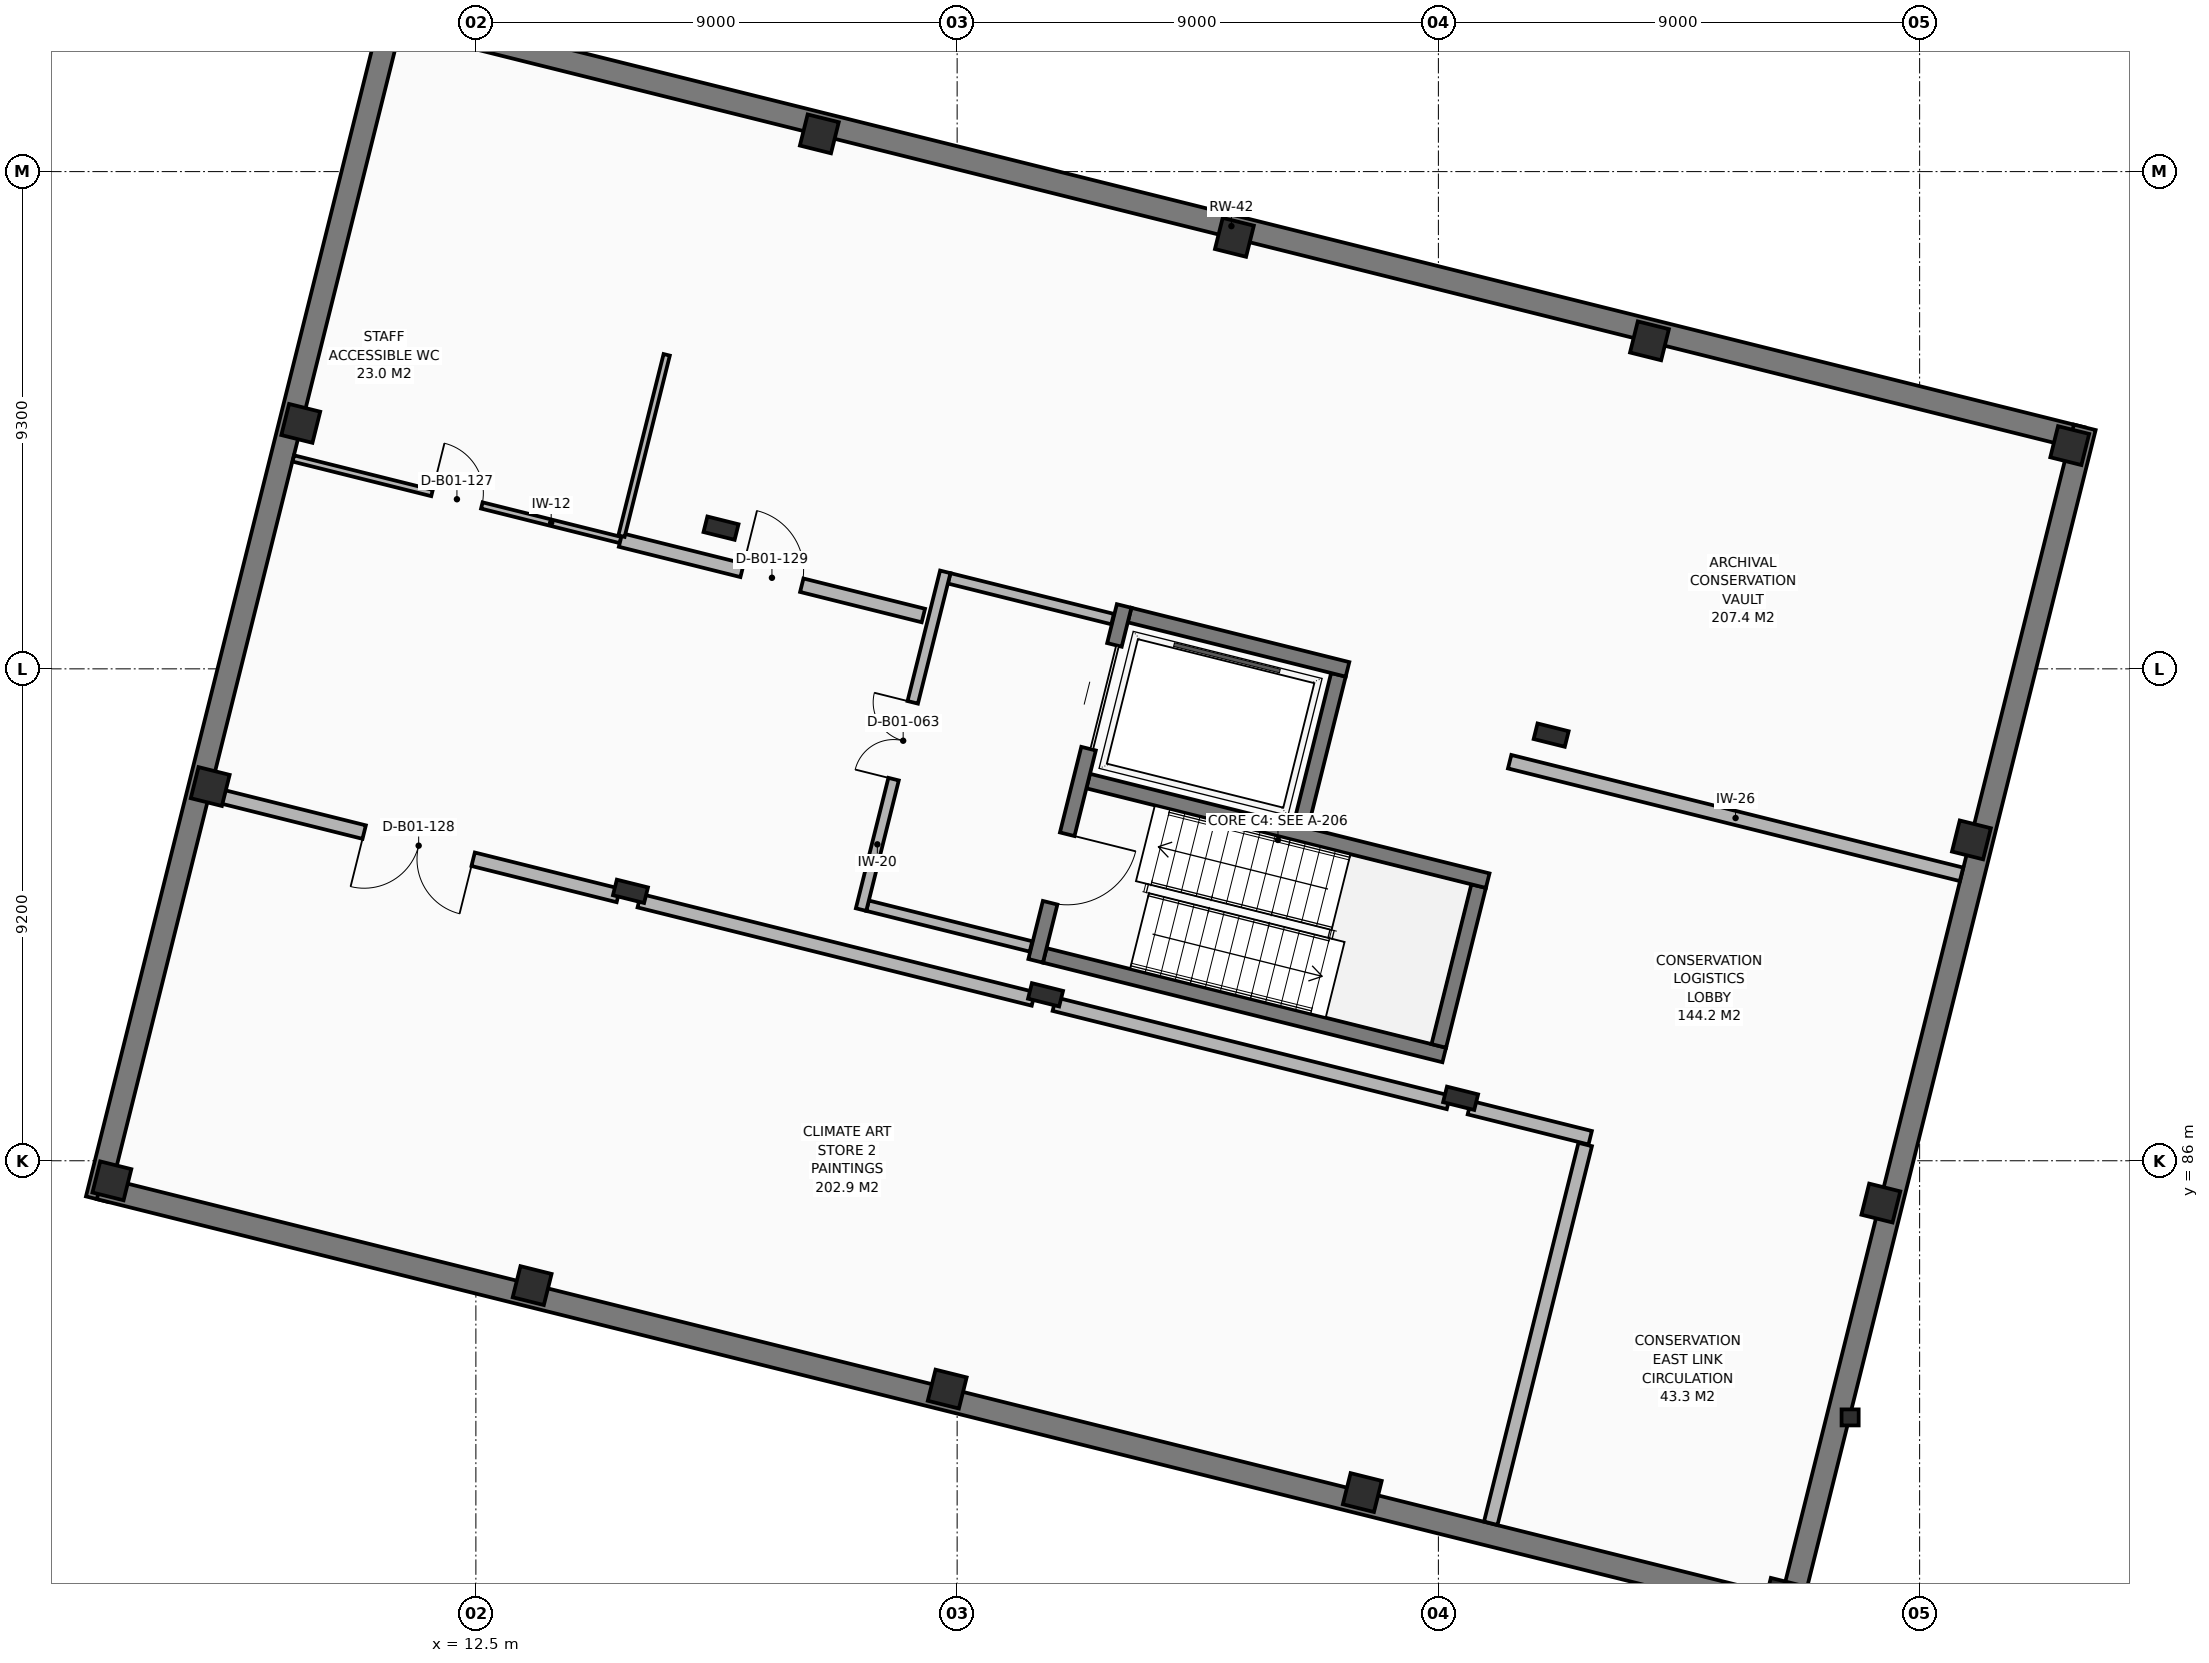
"""IFC4 building model, lengths in metres.
Left out: names, types, materials, properties, quantities, classifications, styles, units other than length and angle.
Written with IfcOpenShell. Run it as: python <this file> out.ifc"""

import sys

from ifc_helpers import new_model, si_unit, direction, frame, frame_2d, origin, origin_2d, place, context, subcontext, project, spatial, rectangle, i_section, extrude, element, fill, save


model = new_model("IFC4")
c1 = context("Model", 3, precision=1e-05, world=origin(), true_north=direction((0.0, 1.0)))
c2 = subcontext(c1, "Body", "Model", "MODEL_VIEW")
j1 = project(units=[si_unit("LENGTHUNIT", "METRE"), si_unit("PLANEANGLEUNIT", "RADIAN")], contexts=[c1])
p1 = place(None, origin())
s1 = spatial("IfcSite", under=j1, at=p1, CompositionType="ELEMENT")
p2 = place(p1, origin())
s2 = spatial("IfcBuilding", under=s1, at=p2, CompositionType="ELEMENT")
p3 = place(p2, frame((0.0, 0.0, -4.8)))
s3 = spatial("IfcBuildingStorey", under=s2, at=p3, CompositionType="ELEMENT", Elevation=-4.8)
for number, where, z_axis, x_axis in (
    (1, (5.693, 85.625, 0.0), (0.0, 0.0, 1.0), (0.97, -0.242, 0.0)),
    (2, (7.531, 92.999, 0.0), (0.0, 0.0, 1.0), (0.97, -0.242, 0.0)),
    (3, (9.225, 99.791, 0.0), (0.0, 0.0, 1.0), (0.97, -0.242, 0.0)),
    (4, (13.552, 83.665, 0.0), (0.0, 0.0, 1.0), (0.97, -0.242, 0.0)),
):
    element("IfcColumn", number, at=place(p3, frame(where, z_axis=z_axis, x_axis=x_axis)), inside=s3, PredefinedType="COLUMN", context=c2, shape_type="SweptSolid", body=[
        extrude(rectangle(XDim=0.6, YDim=0.6, at=origin_2d()), origin(), (0.0, 0.0, 1.0), 4.8),
    ])
for number, where, z_axis, x_axis in (
    (5, (15.391, 91.039, 0.0), (0.0, 0.0, 1.0), (0.97, -0.242, 0.0)),
    (6, (17.084, 97.831, 0.0), (0.0, 0.0, 1.0), (0.97, -0.242, 0.0)),
):
    element("IfcColumn", number, at=place(p3, frame(where, z_axis=z_axis, x_axis=x_axis)), inside=s3, PredefinedType="COLUMN", context=c2, shape_type="SweptSolid", body=[
        extrude(i_section(OverallWidth=0.3, OverallDepth=0.6, WebThickness=0.015, FlangeThickness=0.03, FilletRadius=0.027, at=origin_2d()), origin(), (0.0, 0.0, 1.0), 4.8),
    ])
for number, where, z_axis, x_axis in (
    (7, (18.923, 105.206, 0.0), (0.0, 0.0, 1.0), (0.97, -0.242, 0.0)),
    (8, (21.315, 81.73, 0.0), (0.0, 0.0, 1.0), (0.97, -0.242, 0.0)),
):
    element("IfcColumn", number, at=place(p3, frame(where, z_axis=z_axis, x_axis=x_axis)), inside=s3, PredefinedType="COLUMN", context=c2, shape_type="SweptSolid", body=[
        extrude(rectangle(XDim=0.6, YDim=0.6, at=origin_2d()), origin(), (0.0, 0.0, 1.0), 4.8),
    ])
p4 = place(p3, frame((23.153, 89.104, 0.0), z_axis=(0.0, 0.0, 1.0), x_axis=(0.970295726276, -0.2419218956, 0.0)))
e9 = element("IfcColumn", 9, at=p4, inside=s3, PredefinedType="COLUMN", context=c2, shape_type="SweptSolid", body=[
    extrude(i_section(OverallWidth=0.3, OverallDepth=0.6, WebThickness=0.015, FlangeThickness=0.03, FilletRadius=0.027, at=origin_2d()), origin(), (0.0, 0.0, 1.0), 4.8),
])
for number, where, z_axis, x_axis in (
    (10, (26.685, 103.27, 0.0), (0.0, 0.0, 1.0), (0.97, -0.242, 0.0)),
    (11, (29.077, 79.794, 0.0), (0.0, 0.0, 1.0), (0.97, -0.242, 0.0)),
):
    element("IfcColumn", number, at=place(p3, frame(where, z_axis=z_axis, x_axis=x_axis)), inside=s3, PredefinedType="COLUMN", context=c2, shape_type="SweptSolid", body=[
        extrude(rectangle(XDim=0.6, YDim=0.6, at=origin_2d()), origin(), (0.0, 0.0, 1.0), 4.8),
    ])
for number, where, z_axis, x_axis in (
    (12, (30.916, 87.169, 0.0), (0.0, 0.0, 1.0), (0.97, -0.242, 0.0)),
    (13, (32.609, 93.961, 0.0), (0.0, 0.0, 1.0), (0.97, -0.242, 0.0)),
):
    element("IfcColumn", number, at=place(p3, frame(where, z_axis=z_axis, x_axis=x_axis)), inside=s3, PredefinedType="COLUMN", context=c2, shape_type="SweptSolid", body=[
        extrude(i_section(OverallWidth=0.3, OverallDepth=0.6, WebThickness=0.015, FlangeThickness=0.03, FilletRadius=0.027, at=origin_2d()), origin(), (0.0, 0.0, 1.0), 4.8),
    ])
for number, where, z_axis, x_axis in (
    (14, (34.448, 101.335, 0.0), (0.0, 0.0, 1.0), (0.97, -0.242, 0.0)),
    (15, (36.936, 77.835, 0.0), (0.0, 0.0, 1.0), (0.97, -0.242, 0.0)),
    (16, (38.775, 85.209, 0.0), (0.0, 0.0, 1.0), (0.97, -0.242, 0.0)),
    (17, (40.469, 92.001, 0.0), (0.0, 0.0, 1.0), (0.97, -0.242, 0.0)),
    (18, (42.307, 99.375, 0.0), (0.0, 0.0, 1.0), (0.97, -0.242, 0.0)),
):
    element("IfcColumn", number, at=place(p3, frame(where, z_axis=z_axis, x_axis=x_axis)), inside=s3, PredefinedType="COLUMN", context=c2, shape_type="SweptSolid", body=[
        extrude(rectangle(XDim=0.6, YDim=0.6, at=origin_2d()), origin(), (0.0, 0.0, 1.0), 4.8),
    ])
p5 = place(p3, frame((38.2, 81.2, 0.0), z_axis=(0.0, 0.0, 1.0), x_axis=(1.0, 0.0, 0.0)))
e19 = element("IfcColumn", 19, at=p5, inside=s3, PredefinedType="COLUMN", context=c2, shape_type="SweptSolid", body=[
    extrude(i_section(OverallWidth=0.3, OverallDepth=0.32, WebThickness=0.011, FlangeThickness=0.021, FilletRadius=0.027, at=origin_2d()), origin(), (0.0, 0.0, 1.0), 4.8),
])
p6 = place(p3, frame((5.412, 85.282, 0.0), z_axis=(0.0, 0.0, 1.0), x_axis=(0.241923066972, 0.970295434219, 0.0)))
e20 = element("IfcWall", 20, at=p6, inside=s3, PredefinedType="USERDEFINED", context=c2, shape_type="SweptSolid", body=[
    extrude(rectangle(XDim=22.79, YDim=0.42, at=frame_2d((11.395, 0.0))), origin(), (0.0, 0.0, 1.0), 4.55),
])
p7 = place(p3, frame((10.721, 107.446, 0.0), z_axis=(0.0, 0.0, 1.0), x_axis=(0.970295598121, -0.241922409599, 0.0)))
e21 = element("IfcWall", 21, at=p7, inside=s3, PredefinedType="USERDEFINED", context=c2, shape_type="SweptSolid", body=[
    extrude(rectangle(XDim=32.79, YDim=0.42, at=frame_2d((16.395, 0.0))), origin(), (0.0, 0.0, 1.0), 4.55),
])
p8 = place(p3, frame((42.588, 99.718, 0.0), z_axis=(0.0, 0.0, 1.0), x_axis=(-0.241923066972, -0.970295434219, 0.0)))
e22 = element("IfcWall", 22, at=p8, inside=s3, PredefinedType="USERDEFINED", context=c2, shape_type="SweptSolid", body=[
    extrude(rectangle(XDim=22.79, YDim=0.42, at=frame_2d((11.395, 0.0))), origin(), (0.0, 0.0, 1.0), 4.55),
])
p9 = place(p3, frame((37.279, 77.554, 0.0), z_axis=(0.0, 0.0, 1.0), x_axis=(-0.970295598121, 0.241922409599, 0.0)))
e23 = element("IfcWall", 23, at=p9, inside=s3, PredefinedType="USERDEFINED", context=c2, shape_type="SweptSolid", body=[
    extrude(rectangle(XDim=32.79, YDim=0.42, at=frame_2d((16.395, 0.0))), origin(), (0.0, 0.0, 1.0), 4.55),
])
p10 = place(p3, frame((23.138, 89.841, 0.0), z_axis=(0.0, 0.0, 1.0), x_axis=(0.970295246537, -0.24192381972, 0.0)))
e24 = element("IfcWall", 24, at=p10, inside=s3, PredefinedType="SHEAR", context=c2, shape_type="SweptSolid", body=[
    extrude(rectangle(XDim=7.7, YDim=0.28, at=frame_2d((3.85, 0.0))), origin(), (0.0, 0.0, 1.0), 4.55),
])
p11 = place(p3, frame((30.508, 88.148, 0.0), z_axis=(0.0, 0.0, 1.0), x_axis=(0.241920098373, 0.970296174373, 0.0)))
e25 = element("IfcWall", 25, at=p11, inside=s3, PredefinedType="SHEAR", context=c2, shape_type="SweptSolid", body=[
    extrude(rectangle(XDim=3.08, YDim=0.28, at=frame_2d((1.54, 0.0))), origin(), (0.0, 0.0, 1.0), 4.55),
])
p12 = place(p3, frame((31.422, 91.239, 0.0), z_axis=(0.0, 0.0, 1.0), x_axis=(-0.970297102167, 0.241916377137, 0.0)))
e26 = element("IfcWall", 26, at=p12, inside=s3, PredefinedType="SHEAR", context=c2, shape_type="SweptSolid", body=[
    extrude(rectangle(XDim=7.7, YDim=0.28, at=frame_2d((3.85, 0.0))), origin(), (0.0, 0.0, 1.0), 4.55),
])
p13 = place(p3, frame((27.924, 92.255, 0.0), z_axis=(0.0, 0.0, 1.0), x_axis=(0.241886356621, 0.970304586447, 0.0)))
e27 = element("IfcWall", 27, at=p13, inside=s3, PredefinedType="SHEAR", context=c2, shape_type="SweptSolid", body=[
    extrude(rectangle(XDim=2.92, YDim=0.28, at=frame_2d((1.46, 0.0))), origin(), (0.0, 0.0, 1.0), 4.55),
])
p14 = place(p3, frame((28.8, 95.19, 0.0), z_axis=(0.0, 0.0, 1.0), x_axis=(-0.970292765557, 0.241933770084, 0.0)))
e28 = element("IfcWall", 28, at=p14, inside=s3, PredefinedType="SHEAR", context=c2, shape_type="SweptSolid", body=[
    extrude(rectangle(XDim=4.2, YDim=0.28, at=frame_2d((2.1, 0.0))), origin(), (0.0, 0.0, 1.0), 4.55),
])
p15 = place(p3, frame((24.623, 96.376, 0.0), z_axis=(0.0, 0.0, 1.0), x_axis=(-0.241922508616, -0.970295573434, 0.0)))
e29 = element("IfcWall", 29, at=p15, inside=s3, PredefinedType="SHEAR", context=c2, shape_type="SweptSolid", body=[
    extrude(rectangle(XDim=6.84, YDim=0.28, at=frame_2d((3.42, 0.0))), origin(), (0.0, 0.0, 1.0), 4.55),
])
p16 = place(p15, frame((0.75, 0.0, 0.0)))
e30 = element("IfcOpeningElement", 30, at=p16, cuts=e29, PredefinedType="OPENING", context=c2, shape_type="SweptSolid", body=[
    extrude(rectangle(XDim=2.0, YDim=2.3, at=frame_2d((1.0, 1.15))), frame((0.0, 0.15, 0.0), z_axis=(0.0, -1.0, 0.0), x_axis=(1.0, 0.0, 0.0)), (0.0, 0.0, 1.0), 0.3),
])
p17 = place(p15, frame((4.4, 0.0, 0.0)))
e31 = element("IfcOpeningElement", 31, at=p17, cuts=e29, PredefinedType="OPENING", context=c2, shape_type="SweptSolid", body=[
    extrude(rectangle(XDim=1.32, YDim=2.12, at=frame_2d((0.66, 1.06))), frame((0.0, 0.15, 0.0), z_axis=(0.0, -1.0, 0.0), x_axis=(1.0, 0.0, 0.0)), (0.0, 0.0, 1.0), 0.3),
])
p18 = place(p3, frame((19.824, 90.77, 0.0), z_axis=(0.0, 0.0, 1.0), x_axis=(0.970306396763, -0.241879094592, 0.0)))
e32 = element("IfcWall", 32, at=p18, inside=s3, PredefinedType="PARTITIONING", context=c2, shape_type="SweptSolid", body=[
    extrude(rectangle(XDim=3.15, YDim=0.2, at=frame_2d((1.575, 0.0))), origin(), (0.0, 0.0, 1.0), 4.55),
])
p19 = place(p3, frame((24.407, 96.131, 0.0), z_axis=(0.0, 0.0, 1.0), x_axis=(-0.970301862046, 0.241897285042, 0.0)))
e33 = element("IfcWall", 33, at=p19, inside=s3, PredefinedType="PARTITIONING", context=c2, shape_type="SweptSolid", body=[
    extrude(rectangle(XDim=3.15, YDim=0.2, at=frame_2d((1.575, 0.0))), origin(), (0.0, 0.0, 1.0), 4.04),
])
p20 = place(p3, frame((19.703, 90.698, 0.0), z_axis=(0.0, 0.0, 1.0), x_axis=(0.24192671796, 0.970294523914, 0.0)))
e34 = element("IfcWall", 34, at=p20, inside=s3, PredefinedType="PARTITIONING", context=c2, shape_type="SweptSolid", body=[
    extrude(rectangle(XDim=6.51, YDim=0.2, at=frame_2d((3.255, 0.0))), origin(), (0.0, 0.0, 1.0), 4.04),
])
p21 = place(p20, frame((2.515, 0.0, 0.0)))
e35 = element("IfcOpeningElement", 35, at=p21, cuts=e34, PredefinedType="OPENING", context=c2, shape_type="SweptSolid", body=[
    extrude(rectangle(XDim=1.48, YDim=2.15, at=frame_2d((0.74, 1.075))), frame((0.0, 0.11, 0.0), z_axis=(0.0, -1.0, 0.0), x_axis=(1.0, 0.0, 0.0)), (0.0, 0.0, 1.0), 0.22),
])
p22 = place(p3, frame((9.086, 99.135, 0.0), z_axis=(0.0, 0.0, 1.0), x_axis=(0.970301709613, -0.241897896483, 0.0)))
e36 = element("IfcWall", 36, at=p22, inside=s3, PredefinedType="PARTITIONING", context=c2, shape_type="SweptSolid", body=[
    extrude(rectangle(XDim=6.306, YDim=0.12, at=frame_2d((3.153, 0.0))), origin(), (0.0, 0.0, 1.0), 4.09),
])
p23 = place(p22, frame((2.673, 0.0, 0.0)))
e37 = element("IfcOpeningElement", 37, at=p23, cuts=e36, PredefinedType="OPENING", context=c2, shape_type="SweptSolid", body=[
    extrude(rectangle(XDim=0.96, YDim=2.1, at=frame_2d((0.48, 1.05))), frame((0.0, 0.07, 0.0), z_axis=(0.0, -1.0, 0.0), x_axis=(1.0, 0.0, 0.0)), (0.0, 0.0, 1.0), 0.14),
])
p24 = place(p3, frame((15.164, 90.962, 0.0), z_axis=(0.0, 0.0, 1.0), x_axis=(-0.970289717068, 0.24194599594, 0.0)))
e38 = element("IfcWall", 38, at=p24, inside=s3, PredefinedType="PARTITIONING", context=c2, shape_type="SweptSolid", body=[
    extrude(rectangle(XDim=7.697, YDim=0.26, at=frame_2d((3.849, 0.0))), origin(), (0.0, 0.0, 1.0), 4.04),
])
p25 = place(p24, frame((2.799, 0.0, 0.0)))
e39 = element("IfcOpeningElement", 39, at=p25, cuts=e38, PredefinedType="OPENING", context=c2, shape_type="SweptSolid", body=[
    extrude(rectangle(XDim=2.1, YDim=2.25, at=frame_2d((1.05, 1.125))), frame((0.0, 0.14, 0.0), z_axis=(0.0, -1.0, 0.0), x_axis=(1.0, 0.0, 0.0)), (0.0, 0.0, 1.0), 0.28),
])
p26 = place(p3, frame((22.927, 89.027, 0.0), z_axis=(0.0, 0.0, 1.0), x_axis=(-0.970297308228, 0.24191555065, 0.0)))
e40 = element("IfcWall", 40, at=p26, inside=s3, PredefinedType="PARTITIONING", context=c2, shape_type="SweptSolid", body=[
    extrude(rectangle(XDim=7.597, YDim=0.26, at=frame_2d((3.799, 0.0))), origin(), (0.0, 0.0, 1.0), 4.04),
])
p27 = place(p3, frame((30.689, 87.091, 0.0), z_axis=(0.0, 0.0, 1.0), x_axis=(-0.970295427473, 0.241923094029, 0.0)))
e41 = element("IfcWall", 41, at=p27, inside=s3, PredefinedType="PARTITIONING", context=c2, shape_type="SweptSolid", body=[
    extrude(rectangle(XDim=7.597, YDim=0.26, at=frame_2d((3.798, 0.0))), origin(), (0.0, 0.0, 1.0), 4.04),
])
p28 = place(p3, frame((33.339, 86.43, 0.0), z_axis=(0.0, 0.0, 1.0), x_axis=(-0.970308784597, 0.241869515512, 0.0)))
e42 = element("IfcWall", 42, at=p28, inside=s3, PredefinedType="PARTITIONING", context=c2, shape_type="SweptSolid", body=[
    extrude(rectangle(XDim=2.329, YDim=0.26, at=frame_2d((1.164, 0.0))), origin(), (0.0, 0.0, 1.0), 4.04),
])
p29 = place(p3, frame((15.205, 97.61, 0.0), z_axis=(0.0, 0.0, 1.0), x_axis=(0.970294852546, -0.241925399911, 0.0)))
e43 = element("IfcWall", 43, at=p29, inside=s3, PredefinedType="PARTITIONING", context=c2, shape_type="SweptSolid", body=[
    extrude(rectangle(XDim=5.837, YDim=0.26, at=frame_2d((2.918, 0.0))), origin(), (0.0, 0.0, 1.0), 4.09),
])
p30 = place(p29, frame((2.344, 0.0, 0.0)))
e44 = element("IfcOpeningElement", 44, at=p30, cuts=e43, PredefinedType="OPENING", context=c2, shape_type="SweptSolid", body=[
    extrude(rectangle(XDim=1.15, YDim=2.15, at=frame_2d((0.575, 1.075))), frame((0.0, 0.14, 0.0), z_axis=(0.0, -1.0, 0.0), x_axis=(1.0, 0.0, 0.0)), (0.0, 0.0, 1.0), 0.28),
])
p31 = place(p3, frame((31.833, 93.464, 0.0), z_axis=(0.0, 0.0, 1.0), x_axis=(0.970295661542, -0.241922155234, 0.0)))
e45 = element("IfcWall", 45, at=p31, inside=s3, PredefinedType="PARTITIONING", context=c2, shape_type="SweptSolid", body=[
    extrude(rectangle(XDim=8.709, YDim=0.26, at=frame_2d((4.354, 0.0))), origin(), (0.0, 0.0, 1.0), 4.09),
])
p32 = place(p3, frame((31.479, 79.22, 0.0), z_axis=(0.0, 0.0, 1.0), x_axis=(0.241906112163, 0.970299661392, 0.0)))
e46 = element("IfcWall", 46, at=p32, inside=s3, PredefinedType="PARTITIONING", context=c2, shape_type="SweptSolid", body=[
    extrude(rectangle(XDim=7.301, YDim=0.26, at=frame_2d((3.65, 0.0))), origin(), (0.0, 0.0, 1.0), 4.04),
])
p33 = place(p3, frame((16.069, 101.073, 0.0), z_axis=(0.0, 0.0, 1.0), x_axis=(-0.241976747044, -0.970282048628, 0.0)))
e47 = element("IfcWall", 47, at=p33, inside=s3, PredefinedType="PARTITIONING", context=c2, shape_type="SweptSolid", body=[
    extrude(rectangle(XDim=3.495, YDim=0.12, at=frame_2d((1.748, 0.0))), origin(), (0.0, 0.0, 1.0), 4.04),
])
p34 = place(p16, origin())
e48 = element("IfcDoor", 48, at=p34, inside=s3, OperationType="SLIDING_TO_LEFT", PredefinedType="DOOR", context=c2, shape_type="SweptSolid", body=[
    extrude(rectangle(XDim=2.0, YDim=2.3, at=frame_2d((1.0, 1.15))), frame((0.0, 0.025, 0.0), z_axis=(0.0, -1.0, 0.0), x_axis=(1.0, 0.0, 0.0)), (0.0, 0.0, 1.0), 0.05),
])
fill(e30, e48)
p35 = place(p17, origin())
e49 = element("IfcDoor", 49, at=p35, inside=s3, OperationType="SINGLE_SWING_LEFT", PredefinedType="DOOR", context=c2, shape_type="SweptSolid", body=[
    extrude(rectangle(XDim=1.32, YDim=2.12, at=frame_2d((0.66, 1.06))), frame((0.0, 0.025, 0.0), z_axis=(0.0, -1.0, 0.0), x_axis=(1.0, 0.0, 0.0)), (0.0, 0.0, 1.0), 0.05),
])
fill(e31, e49)
p36 = place(p21, origin())
e50 = element("IfcDoor", 50, at=p36, inside=s3, OperationType="DOUBLE_DOOR_SINGLE_SWING", PredefinedType="DOOR", context=c2, shape_type="SweptSolid", body=[
    extrude(rectangle(XDim=1.48, YDim=2.15, at=frame_2d((0.74, 1.075))), frame((0.0, 0.025, 0.0), z_axis=(0.0, -1.0, 0.0), x_axis=(1.0, 0.0, 0.0)), (0.0, 0.0, 1.0), 0.05),
])
fill(e35, e50)
p37 = place(p23, origin())
e51 = element("IfcDoor", 51, at=p37, inside=s3, OperationType="SINGLE_SWING_LEFT", PredefinedType="DOOR", context=c2, shape_type="SweptSolid", body=[
    extrude(rectangle(XDim=0.96, YDim=2.1, at=frame_2d((0.48, 1.05))), frame((0.0, 0.025, 0.0), z_axis=(0.0, -1.0, 0.0), x_axis=(1.0, 0.0, 0.0)), (0.0, 0.0, 1.0), 0.05),
])
fill(e37, e51)
p38 = place(p25, origin())
e52 = element("IfcDoor", 52, at=p38, inside=s3, OperationType="DOUBLE_DOOR_SINGLE_SWING", PredefinedType="DOOR", context=c2, shape_type="SweptSolid", body=[
    extrude(rectangle(XDim=2.1, YDim=2.25, at=frame_2d((1.05, 1.125))), frame((0.0, 0.025, 0.0), z_axis=(0.0, -1.0, 0.0), x_axis=(1.0, 0.0, 0.0)), (0.0, 0.0, 1.0), 0.05),
])
fill(e39, e52)
p39 = place(p30, origin())
e53 = element("IfcDoor", 53, at=p39, inside=s3, OperationType="SINGLE_SWING_LEFT", PredefinedType="DOOR", context=c2, shape_type="SweptSolid", body=[
    extrude(rectangle(XDim=1.15, YDim=2.15, at=frame_2d((0.575, 1.075))), frame((0.0, 0.025, 0.0), z_axis=(0.0, -1.0, 0.0), x_axis=(1.0, 0.0, 0.0)), (0.0, 0.0, 1.0), 0.05),
])
fill(e44, e53)
save(model, sys.argv[1])
